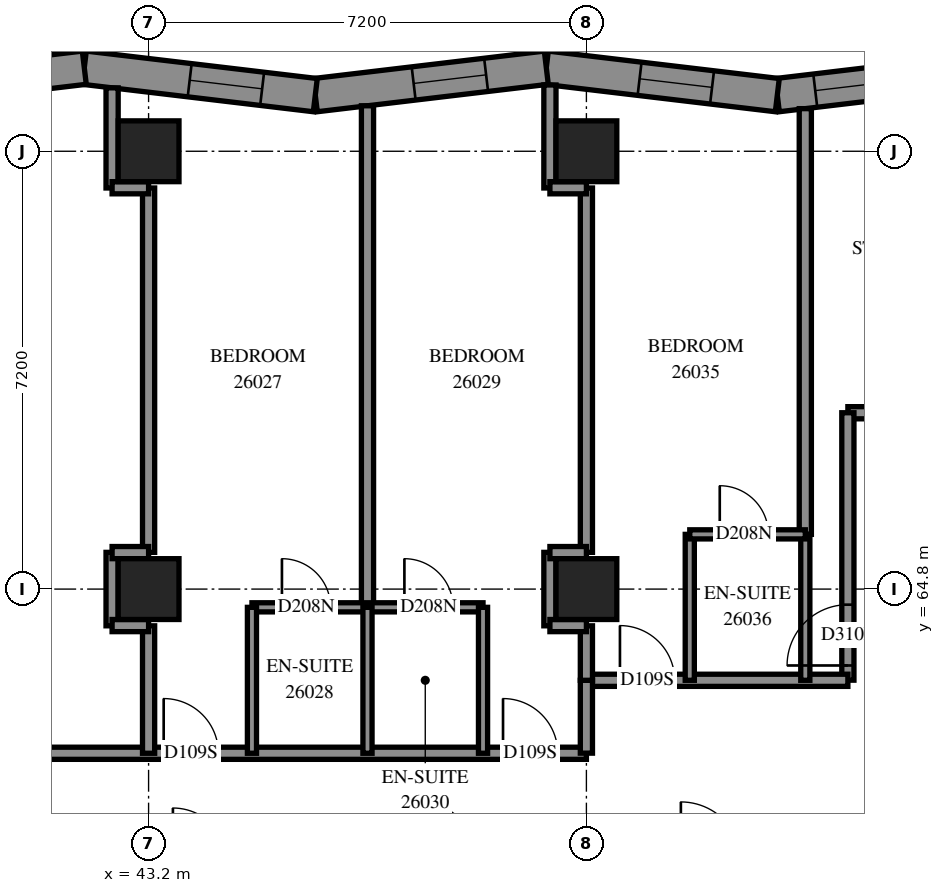
"""IFC4 building model, lengths in metres.
Left out: names, types, materials, properties, quantities, classifications, styles, units other than length and angle.
Written with IfcOpenShell. Run it as: python <this file> out.ifc"""

import sys

from ifc_helpers import new_model, si_unit, direction, frame, frame_2d, origin, origin_2d, place, context, subcontext, project, spatial, polyline, rectangle, outline, extrude, element, fill, save


model = new_model("IFC4")
c1 = context("Model", 3, precision=1e-05, world=origin(), true_north=direction((0.0, 1.0)))
c2 = subcontext(c1, "Body", "Model", "MODEL_VIEW")
j1 = project(units=[si_unit("LENGTHUNIT", "METRE"), si_unit("PLANEANGLEUNIT", "RADIAN")], contexts=[c1])
p1 = place(None, origin())
s1 = spatial("IfcSite", under=j1, at=p1, CompositionType="ELEMENT")
p2 = place(p1, origin())
s2 = spatial("IfcBuilding", under=s1, at=p2, CompositionType="ELEMENT")
p3 = place(p2, frame((0.0, 0.0, 98.2)))
s3 = spatial("IfcBuildingStorey", under=s2, at=p3, CompositionType="ELEMENT", Elevation=98.2)
for number, where, z_axis, x_axis in (
    (1, (43.2, 64.8, 0.0), (0.0, 0.0, 1.0), (1.0, 0.0, 0.0)),
    (2, (43.2, 72.0, 0.0), (0.0, 0.0, 1.0), (1.0, 0.0, 0.0)),
    (3, (50.4, 64.8, 0.0), (0.0, 0.0, 1.0), (1.0, 0.0, 0.0)),
    (4, (50.4, 72.0, 0.0), (0.0, 0.0, 1.0), (1.0, 0.0, 0.0)),
):
    element("IfcColumn", number, at=place(p3, frame(where, z_axis=z_axis, x_axis=x_axis)), inside=s3, PredefinedType="COLUMN", context=c2, shape_type="SweptSolid", body=[
        extrude(rectangle(XDim=1.0, YDim=1.0, at=origin_2d()), origin(), (0.0, 0.0, 1.0), 3.1),
    ])
p4 = place(p3, frame((57.339, 73.374, 0.0), z_axis=(0.0, 0.0, 1.0), x_axis=(-0.9930265769, -0.1178907016, 0.0)))
e5 = element("IfcWall", 5, at=p4, inside=s3, PredefinedType="SOLIDWALL", context=c2, shape_type="SweptSolid", body=[
    extrude(outline(polyline([(-0.033, -0.275), (3.793, -0.275), (3.858, 0.275), (0.033, 0.275), (-0.033, -0.275)])), origin(), (0.0, 0.0, 1.0), 3.1),
])
p5 = place(p4, frame((0.397, 0.0, 0.5)))
e6 = element("IfcOpeningElement", 6, at=p5, cuts=e5, PredefinedType="OPENING", context=c2, shape_type="SweptSolid", body=[
    extrude(rectangle(XDim=1.3, YDim=2.45, at=frame_2d((0.65, 1.225))), frame((0.0, 0.285, 0.0), z_axis=(0.0, -1.0, 0.0), x_axis=(1.0, 0.0, 0.0)), (0.0, 0.0, 1.0), 0.57),
])
p6 = place(p4, frame((1.897, 0.0, 0.5)))
e7 = element("IfcOpeningElement", 7, at=p6, cuts=e5, PredefinedType="OPENING", context=c2, shape_type="SweptSolid", body=[
    extrude(rectangle(XDim=1.3, YDim=2.45, at=frame_2d((0.65, 1.225))), frame((0.0, 0.285, 0.0), z_axis=(0.0, -1.0, 0.0), x_axis=(1.0, 0.0, 0.0)), (0.0, 0.0, 1.0), 0.57),
])
p7 = place(p3, frame((53.54, 72.923, 0.0), z_axis=(0.0, 0.0, 1.0), x_axis=(-0.9930269402, 0.1178876415, 0.0)))
e8 = element("IfcWall", 8, at=p7, inside=s3, PredefinedType="SOLIDWALL", context=c2, shape_type="SweptSolid", body=[
    extrude(outline(polyline([(0.033, -0.275), (3.858, -0.275), (3.793, 0.275), (-0.033, 0.275), (0.033, -0.275)])), origin(), (0.0, 0.0, 1.0), 3.1),
])
p8 = place(p7, frame((1.081, 0.0, 0.5)))
e9 = element("IfcOpeningElement", 9, at=p8, cuts=e8, PredefinedType="OPENING", context=c2, shape_type="SweptSolid", body=[
    extrude(rectangle(XDim=1.2, YDim=2.45, at=frame_2d((0.6, 1.225))), frame((0.0, 0.285, 0.0), z_axis=(0.0, -1.0, 0.0), x_axis=(1.0, 0.0, 0.0)), (0.0, 0.0, 1.0), 0.57),
])
p9 = place(p3, frame((49.741, 73.374, 0.0), z_axis=(0.0, 0.0, 1.0), x_axis=(-0.9930265769, -0.1178907016, 0.0)))
e10 = element("IfcWall", 10, at=p9, inside=s3, PredefinedType="SOLIDWALL", context=c2, shape_type="SweptSolid", body=[
    extrude(outline(polyline([(-0.033, -0.275), (3.793, -0.275), (3.858, 0.275), (0.033, 0.275), (-0.033, -0.275)])), origin(), (0.0, 0.0, 1.0), 3.1),
])
p10 = place(p9, frame((0.997, 0.0, 0.5)))
e11 = element("IfcOpeningElement", 11, at=p10, cuts=e10, PredefinedType="OPENING", context=c2, shape_type="SweptSolid", body=[
    extrude(rectangle(XDim=1.2, YDim=2.45, at=frame_2d((0.6, 1.225))), frame((0.0, 0.285, 0.0), z_axis=(0.0, -1.0, 0.0), x_axis=(1.0, 0.0, 0.0)), (0.0, 0.0, 1.0), 0.57),
])
p11 = place(p3, frame((45.942, 72.923, 0.0), z_axis=(0.0, 0.0, 1.0), x_axis=(-0.9930269402, 0.1178876415, 0.0)))
e12 = element("IfcWall", 12, at=p11, inside=s3, PredefinedType="SOLIDWALL", context=c2, shape_type="SweptSolid", body=[
    extrude(outline(polyline([(0.033, -0.275), (3.858, -0.275), (3.793, 0.275), (-0.033, 0.275), (0.033, -0.275)])), origin(), (0.0, 0.0, 1.0), 3.1),
])
p12 = place(p11, frame((0.88, 0.0, 0.5)))
e13 = element("IfcOpeningElement", 13, at=p12, cuts=e12, PredefinedType="OPENING", context=c2, shape_type="SweptSolid", body=[
    extrude(rectangle(XDim=1.2, YDim=2.45, at=frame_2d((0.6, 1.225))), frame((0.0, 0.285, 0.0), z_axis=(0.0, -1.0, 0.0), x_axis=(1.0, 0.0, 0.0)), (0.0, 0.0, 1.0), 0.57),
])
p13 = place(p3, frame((42.143, 73.374, 0.0), z_axis=(0.0, 0.0, 1.0), x_axis=(-0.9930269402, -0.1178876415, 0.0)))
e14 = element("IfcWall", 14, at=p13, inside=s3, PredefinedType="SOLIDWALL", context=c2, shape_type="SweptSolid", body=[
    extrude(outline(polyline([(-0.033, -0.275), (3.793, -0.275), (3.858, 0.275), (0.033, 0.275), (-0.033, -0.275)])), origin(), (0.0, 0.0, 1.0), 3.1),
])
p14 = place(p13, frame((0.797, 0.0, 0.5)))
e15 = element("IfcOpeningElement", 15, at=p14, cuts=e14, PredefinedType="OPENING", context=c2, shape_type="SweptSolid", body=[
    extrude(rectangle(XDim=1.2, YDim=2.45, at=frame_2d((0.6, 1.225))), frame((0.0, 0.285, 0.0), z_axis=(0.0, -1.0, 0.0), x_axis=(1.0, 0.0, 0.0)), (0.0, 0.0, 1.0), 0.57),
])
p15 = place(p3, frame((54.7, 67.7, 0.0), z_axis=(0.0, 0.0, 1.0), x_axis=(1.0, 0.0, 0.0)))
e16 = element("IfcWall", 16, at=p15, inside=s3, PredefinedType="PARTITIONING", context=c2, shape_type="SweptSolid", body=[
    extrude(rectangle(XDim=20.2, YDim=0.2, at=frame_2d((10.1, 0.0))), origin(), (0.0, 0.0, 1.0), 3.1),
])
p16 = place(p15, frame((5.25, 0.0, 0.0)))
e17 = element("IfcOpeningElement", 17, at=p16, cuts=e16, PredefinedType="OPENING", context=c2, shape_type="SweptSolid", body=[
    extrude(rectangle(XDim=0.9, YDim=2.1, at=frame_2d((0.45, 1.05))), frame((0.0, 0.11, 0.0), z_axis=(0.0, -1.0, 0.0), x_axis=(1.0, 0.0, 0.0)), (0.0, 0.0, 1.0), 0.22),
])
p17 = place(p15, frame((6.9, 0.0, 0.0)))
e18 = element("IfcOpeningElement", 18, at=p17, cuts=e16, PredefinedType="OPENING", context=c2, shape_type="SweptSolid", body=[
    extrude(rectangle(XDim=0.9, YDim=2.1, at=frame_2d((0.45, 1.05))), frame((0.0, 0.11, 0.0), z_axis=(0.0, -1.0, 0.0), x_axis=(1.0, 0.0, 0.0)), (0.0, 0.0, 1.0), 0.22),
])
p18 = place(p15, frame((12.45, 0.0, 0.0)))
e19 = element("IfcOpeningElement", 19, at=p18, cuts=e16, PredefinedType="OPENING", context=c2, shape_type="SweptSolid", body=[
    extrude(rectangle(XDim=0.9, YDim=2.1, at=frame_2d((0.45, 1.05))), frame((0.0, 0.11, 0.0), z_axis=(0.0, -1.0, 0.0), x_axis=(1.0, 0.0, 0.0)), (0.0, 0.0, 1.0), 0.22),
])
p19 = place(p15, frame((14.1, 0.0, 0.0)))
e20 = element("IfcOpeningElement", 20, at=p19, cuts=e16, PredefinedType="OPENING", context=c2, shape_type="SweptSolid", body=[
    extrude(rectangle(XDim=0.9, YDim=2.1, at=frame_2d((0.45, 1.05))), frame((0.0, 0.11, 0.0), z_axis=(0.0, -1.0, 0.0), x_axis=(1.0, 0.0, 0.0)), (0.0, 0.0, 1.0), 0.22),
])
p20 = place(p3, frame((33.3, 62.1, 0.0), z_axis=(0.0, 0.0, 1.0), x_axis=(1.0, 0.0, 0.0)))
e21 = element("IfcWall", 21, at=p20, inside=s3, PredefinedType="PARTITIONING", context=c2, shape_type="SweptSolid", body=[
    extrude(rectangle(XDim=17.1, YDim=0.2, at=frame_2d((8.55, 0.0))), origin(), (0.0, 0.0, 1.0), 3.1),
])
p21 = place(p20, frame((6.258, 0.0, 0.0)))
e22 = element("IfcOpeningElement", 22, at=p21, cuts=e21, PredefinedType="OPENING", context=c2, shape_type="SweptSolid", body=[
    extrude(rectangle(XDim=1.0, YDim=2.1, at=frame_2d((0.5, 1.05))), frame((0.0, 0.11, 0.0), z_axis=(0.0, -1.0, 0.0), x_axis=(1.0, 0.0, 0.0)), (0.0, 0.0, 1.0), 0.22),
])
p22 = place(p20, frame((10.148, 0.0, 0.0)))
e23 = element("IfcOpeningElement", 23, at=p22, cuts=e21, PredefinedType="OPENING", context=c2, shape_type="SweptSolid", body=[
    extrude(rectangle(XDim=0.9, YDim=2.1, at=frame_2d((0.45, 1.05))), frame((0.0, 0.11, 0.0), z_axis=(0.0, -1.0, 0.0), x_axis=(1.0, 0.0, 0.0)), (0.0, 0.0, 1.0), 0.22),
])
p23 = place(p20, frame((15.729, 0.0, 0.0)))
e24 = element("IfcOpeningElement", 24, at=p23, cuts=e21, PredefinedType="OPENING", context=c2, shape_type="SweptSolid", body=[
    extrude(rectangle(XDim=0.9, YDim=2.1, at=frame_2d((0.45, 1.05))), frame((0.0, 0.11, 0.0), z_axis=(0.0, -1.0, 0.0), x_axis=(1.0, 0.0, 0.0)), (0.0, 0.0, 1.0), 0.22),
])
p24 = place(p3, frame((46.8, 64.5, 0.0), z_axis=(0.0, 0.0, 1.0), x_axis=(0.0, 1.0, 0.0)))
e25 = element("IfcWall", 25, at=p24, inside=s3, PredefinedType="PARTITIONING", context=c2, shape_type="SweptSolid", body=[
    extrude(rectangle(XDim=8.248, YDim=0.2, at=frame_2d((4.124, 0.0))), origin(), (0.0, 0.0, 1.0), 3.1),
])
p25 = place(p3, frame((54.0, 65.7, 0.0), z_axis=(0.0, 0.0, 1.0), x_axis=(0.0, 1.0, 0.0)))
e26 = element("IfcWall", 26, at=p25, inside=s3, PredefinedType="PARTITIONING", context=c2, shape_type="SweptSolid", body=[
    extrude(rectangle(XDim=7.001, YDim=0.2, at=frame_2d((3.5, 0.0))), origin(), (0.0, 0.0, 1.0), 3.1),
])
for number, where, z_axis, x_axis in (
    (27, (43.2, 65.404, 0.0), (0.0, 0.0, 1.0), (0.0, 1.0, 0.0)),
    (28, (50.4, 65.404, 0.0), (0.0, 0.0, 1.0), (0.0, 1.0, 0.0)),
):
    element("IfcWall", number, at=place(p3, frame(where, z_axis=z_axis, x_axis=x_axis)), inside=s3, PredefinedType="PARTITIONING", context=c2, shape_type="SweptSolid", body=[
        extrude(rectangle(XDim=5.992, YDim=0.2, at=frame_2d((2.996, 0.0))), origin(), (0.0, 0.0, 1.0), 3.1),
    ])
p26 = place(p3, frame((54.7, 63.302, 0.0), z_axis=(0.0, 0.0, 1.0), x_axis=(0.0, 1.0, 0.0)))
e29 = element("IfcWall", 29, at=p26, inside=s3, PredefinedType="PARTITIONING", context=c2, shape_type="SweptSolid", body=[
    extrude(rectangle(XDim=4.398, YDim=0.2, at=frame_2d((2.199, 0.0))), origin(), (0.0, 0.0, 1.0), 3.1),
])
p27 = place(p26, frame((0.242, 0.0, 0.0)))
e30 = element("IfcOpeningElement", 30, at=p27, cuts=e29, PredefinedType="OPENING", context=c2, shape_type="SweptSolid", body=[
    extrude(rectangle(XDim=1.0, YDim=2.1, at=frame_2d((0.5, 1.05))), frame((0.0, 0.11, 0.0), z_axis=(0.0, -1.0, 0.0), x_axis=(1.0, 0.0, 0.0)), (0.0, 0.0, 1.0), 0.22),
])
p28 = place(p3, frame((50.4, 63.3, 0.0), z_axis=(0.0, 0.0, 1.0), x_axis=(1.0, 0.0, 0.0)))
e31 = element("IfcWall", 31, at=p28, inside=s3, PredefinedType="PARTITIONING", context=c2, shape_type="SweptSolid", body=[
    extrude(rectangle(XDim=4.3, YDim=0.2, at=frame_2d((2.15, 0.0))), origin(), (0.0, 0.0, 1.0), 3.1),
])
p29 = place(p28, frame((0.552, 0.0, 0.0)))
e32 = element("IfcOpeningElement", 32, at=p29, cuts=e31, PredefinedType="OPENING", context=c2, shape_type="SweptSolid", body=[
    extrude(rectangle(XDim=0.9, YDim=2.1, at=frame_2d((0.45, 1.05))), frame((0.0, 0.11, 0.0), z_axis=(0.0, -1.0, 0.0), x_axis=(1.0, 0.0, 0.0)), (0.0, 0.0, 1.0), 0.22),
])
p30 = place(p3, frame((44.9, 64.5, 0.0), z_axis=(0.0, 0.0, 1.0), x_axis=(1.0, 0.0, 0.0)))
e33 = element("IfcWall", 33, at=p30, inside=s3, PredefinedType="PARTITIONING", context=c2, shape_type="SweptSolid", body=[
    extrude(rectangle(XDim=3.8, YDim=0.15, at=frame_2d((1.9, 0.0))), origin(), (0.0, 0.0, 1.0), 3.1),
])
p31 = place(p30, frame((0.493, 0.0, 0.0)))
e34 = element("IfcOpeningElement", 34, at=p31, cuts=e33, PredefinedType="OPENING", context=c2, shape_type="SweptSolid", body=[
    extrude(rectangle(XDim=0.8, YDim=2.1, at=frame_2d((0.4, 1.05))), frame((0.0, 0.085, 0.0), z_axis=(0.0, -1.0, 0.0), x_axis=(1.0, 0.0, 0.0)), (0.0, 0.0, 1.0), 0.17),
])
p32 = place(p30, frame((2.507, 0.0, 0.0)))
e35 = element("IfcOpeningElement", 35, at=p32, cuts=e33, PredefinedType="OPENING", context=c2, shape_type="SweptSolid", body=[
    extrude(rectangle(XDim=0.8, YDim=2.1, at=frame_2d((0.4, 1.05))), frame((0.0, 0.085, 0.0), z_axis=(0.0, -1.0, 0.0), x_axis=(1.0, 0.0, 0.0)), (0.0, 0.0, 1.0), 0.17),
])
for number, where, z_axis, x_axis in (
    (36, (52.1, 63.3, 0.0), (0.0, 0.0, 1.0), (0.0, 1.0, 0.0)),
    (37, (54.0, 63.3, 0.0), (0.0, 0.0, 1.0), (0.0, 1.0, 0.0)),
    (38, (44.9, 62.1, 0.0), (0.0, 0.0, 1.0), (0.0, 1.0, 0.0)),
    (39, (46.8, 62.1, 0.0), (0.0, 0.0, 1.0), (0.0, 1.0, 0.0)),
    (40, (48.7, 62.1, 0.0), (0.0, 0.0, 1.0), (0.0, 1.0, 0.0)),
):
    element("IfcWall", number, at=place(p3, frame(where, z_axis=z_axis, x_axis=x_axis)), inside=s3, PredefinedType="PARTITIONING", context=c2, shape_type="SweptSolid", body=[
        extrude(rectangle(XDim=2.4, YDim=0.15, at=frame_2d((1.2, 0.0))), origin(), (0.0, 0.0, 1.0), 3.1),
    ])
p33 = place(p3, frame((43.2, 62.1, 0.0), z_axis=(0.0, 0.0, 1.0), x_axis=(0.0, 1.0, 0.0)))
e41 = element("IfcWall", 41, at=p33, inside=s3, PredefinedType="PARTITIONING", context=c2, shape_type="SweptSolid", body=[
    extrude(rectangle(XDim=2.096, YDim=0.2, at=frame_2d((1.048, 0.0))), origin(), (0.0, 0.0, 1.0), 3.1),
])
p34 = place(p3, frame((52.1, 65.7, 0.0), z_axis=(0.0, 0.0, 1.0), x_axis=(1.0, 0.0, 0.0)))
e42 = element("IfcWall", 42, at=p34, inside=s3, PredefinedType="PARTITIONING", context=c2, shape_type="SweptSolid", body=[
    extrude(rectangle(XDim=1.9, YDim=0.15, at=frame_2d((0.95, 0.0))), origin(), (0.0, 0.0, 1.0), 3.1),
])
p35 = place(p34, frame((0.493, 0.0, 0.0)))
e43 = element("IfcOpeningElement", 43, at=p35, cuts=e42, PredefinedType="OPENING", context=c2, shape_type="SweptSolid", body=[
    extrude(rectangle(XDim=0.8, YDim=2.1, at=frame_2d((0.4, 1.05))), frame((0.0, 0.085, 0.0), z_axis=(0.0, -1.0, 0.0), x_axis=(1.0, 0.0, 0.0)), (0.0, 0.0, 1.0), 0.17),
])
p36 = place(p3, frame((49.8, 71.396, 0.0), z_axis=(0.0, 0.0, 1.0), x_axis=(0.0, 1.0, 0.0)))
e44 = element("IfcWall", 44, at=p36, inside=s3, PredefinedType="PARTITIONING", context=c2, shape_type="SweptSolid", body=[
    extrude(rectangle(XDim=1.694, YDim=0.2, at=frame_2d((0.847, 0.0))), origin(), (0.0, 0.0, 1.0), 3.1),
])
p37 = place(p3, frame((42.6, 71.396, 0.0), z_axis=(0.0, 0.0, 1.0), x_axis=(0.0, 1.0, 0.0)))
e45 = element("IfcWall", 45, at=p37, inside=s3, PredefinedType="PARTITIONING", context=c2, shape_type="SweptSolid", body=[
    extrude(rectangle(XDim=1.647, YDim=0.2, at=frame_2d((0.824, 0.0))), origin(), (0.0, 0.0, 1.0), 3.1),
])
for number, where, z_axis, x_axis in (
    (46, (42.6, 64.196, 0.0), (0.0, 0.0, 1.0), (0.0, 1.0, 0.0)),
    (47, (49.8, 64.196, 0.0), (0.0, 0.0, 1.0), (0.0, 1.0, 0.0)),
):
    element("IfcWall", number, at=place(p3, frame(where, z_axis=z_axis, x_axis=x_axis)), inside=s3, PredefinedType="PARTITIONING", context=c2, shape_type="SweptSolid", body=[
        extrude(rectangle(XDim=1.208, YDim=0.2, at=frame_2d((0.604, 0.0))), origin(), (0.0, 0.0, 1.0), 3.1),
    ])
p38 = place(p3, frame((50.4, 62.102, 0.0), z_axis=(0.0, 0.0, 1.0), x_axis=(0.0, 1.0, 0.0)))
e48 = element("IfcWall", 48, at=p38, inside=s3, PredefinedType="PARTITIONING", context=c2, shape_type="SweptSolid", body=[
    extrude(rectangle(XDim=1.198, YDim=0.2, at=frame_2d((0.599, 0.0))), origin(), (0.0, 0.0, 1.0), 3.1),
])
p39 = place(p3, frame((50.4, 63.3, 0.0), z_axis=(0.0, 0.0, 1.0), x_axis=(0.0, 1.0, 0.0)))
e49 = element("IfcWall", 49, at=p39, inside=s3, PredefinedType="PARTITIONING", context=c2, shape_type="SweptSolid", body=[
    extrude(rectangle(XDim=0.896, YDim=0.2, at=frame_2d((0.448, 0.0))), origin(), (0.0, 0.0, 1.0), 3.1),
])
for number, where, z_axis, x_axis in (
    (50, (42.6, 71.4, 0.0), (0.0, 0.0, 1.0), (1.0, 0.0, 0.0)),
    (51, (49.8, 71.4, 0.0), (0.0, 0.0, 1.0), (1.0, 0.0, 0.0)),
    (52, (42.6, 65.4, 0.0), (0.0, 0.0, 1.0), (1.0, 0.0, 0.0)),
    (53, (49.8, 65.4, 0.0), (0.0, 0.0, 1.0), (1.0, 0.0, 0.0)),
    (54, (42.6, 64.2, 0.0), (0.0, 0.0, 1.0), (1.0, 0.0, 0.0)),
    (55, (49.8, 64.2, 0.0), (0.0, 0.0, 1.0), (1.0, 0.0, 0.0)),
):
    element("IfcWall", number, at=place(p3, frame(where, z_axis=z_axis, x_axis=x_axis)), inside=s3, PredefinedType="PARTITIONING", context=c2, shape_type="SweptSolid", body=[
        extrude(rectangle(XDim=0.6, YDim=0.2, at=frame_2d((0.3, 0.0))), origin(), (0.0, 0.0, 1.0), 3.1),
    ])
p40 = place(p6, origin())
e56 = element("IfcWindow", 56, at=p40, inside=s3, PartitioningType="SINGLE_PANEL", PredefinedType="WINDOW", context=c2, shape_type="SweptSolid", body=[
    extrude(rectangle(XDim=1.3, YDim=2.45, at=frame_2d((0.65, 1.225))), frame((0.0, 0.155, 0.0), z_axis=(0.0, -1.0, 0.0), x_axis=(1.0, 0.0, 0.0)), (0.0, 0.0, 1.0), 0.06),
])
fill(e7, e56)
p41 = place(p8, origin())
e57 = element("IfcWindow", 57, at=p41, inside=s3, PartitioningType="SINGLE_PANEL", PredefinedType="WINDOW", context=c2, shape_type="SweptSolid", body=[
    extrude(rectangle(XDim=1.2, YDim=2.45, at=frame_2d((0.6, 1.225))), frame((0.0, 0.155, 0.0), z_axis=(0.0, -1.0, 0.0), x_axis=(1.0, 0.0, 0.0)), (0.0, 0.0, 1.0), 0.06),
])
fill(e9, e57)
p42 = place(p10, origin())
e58 = element("IfcWindow", 58, at=p42, inside=s3, PartitioningType="SINGLE_PANEL", PredefinedType="WINDOW", context=c2, shape_type="SweptSolid", body=[
    extrude(rectangle(XDim=1.2, YDim=2.45, at=frame_2d((0.6, 1.225))), frame((0.0, 0.155, 0.0), z_axis=(0.0, -1.0, 0.0), x_axis=(1.0, 0.0, 0.0)), (0.0, 0.0, 1.0), 0.06),
])
fill(e11, e58)
p43 = place(p12, origin())
e59 = element("IfcWindow", 59, at=p43, inside=s3, PartitioningType="SINGLE_PANEL", PredefinedType="WINDOW", context=c2, shape_type="SweptSolid", body=[
    extrude(rectangle(XDim=1.2, YDim=2.45, at=frame_2d((0.6, 1.225))), frame((0.0, 0.155, 0.0), z_axis=(0.0, -1.0, 0.0), x_axis=(1.0, 0.0, 0.0)), (0.0, 0.0, 1.0), 0.06),
])
fill(e13, e59)
p44 = place(p22, origin())
e60 = element("IfcDoor", 60, at=p44, inside=s3, OperationType="SINGLE_SWING_RIGHT", PredefinedType="DOOR", context=c2, shape_type="SweptSolid", body=[
    extrude(rectangle(XDim=0.9, YDim=2.1, at=frame_2d((0.45, 1.05))), frame((0.0, 0.025, 0.0), z_axis=(0.0, -1.0, 0.0), x_axis=(1.0, 0.0, 0.0)), (0.0, 0.0, 1.0), 0.05),
])
fill(e23, e60)
p45 = place(p31, origin())
e61 = element("IfcDoor", 61, at=p45, inside=s3, OperationType="SINGLE_SWING_RIGHT", PredefinedType="DOOR", context=c2, shape_type="SweptSolid", body=[
    extrude(rectangle(XDim=0.8, YDim=2.1, at=frame_2d((0.4, 1.05))), frame((0.0, 0.025, 0.0), z_axis=(0.0, -1.0, 0.0), x_axis=(1.0, 0.0, 0.0)), (0.0, 0.0, 1.0), 0.05),
])
fill(e34, e61)
p46 = place(p23, origin())
e62 = element("IfcDoor", 62, at=p46, inside=s3, OperationType="SINGLE_SWING_LEFT", PredefinedType="DOOR", context=c2, shape_type="SweptSolid", body=[
    extrude(rectangle(XDim=0.9, YDim=2.1, at=frame_2d((0.45, 1.05))), frame((0.0, 0.025, 0.0), z_axis=(0.0, -1.0, 0.0), x_axis=(1.0, 0.0, 0.0)), (0.0, 0.0, 1.0), 0.05),
])
fill(e24, e62)
p47 = place(p32, origin())
e63 = element("IfcDoor", 63, at=p47, inside=s3, OperationType="SINGLE_SWING_RIGHT", PredefinedType="DOOR", context=c2, shape_type="SweptSolid", body=[
    extrude(rectangle(XDim=0.8, YDim=2.1, at=frame_2d((0.4, 1.05))), frame((0.0, 0.025, 0.0), z_axis=(0.0, -1.0, 0.0), x_axis=(1.0, 0.0, 0.0)), (0.0, 0.0, 1.0), 0.05),
])
fill(e35, e63)
p48 = place(p29, origin())
e64 = element("IfcDoor", 64, at=p48, inside=s3, OperationType="SINGLE_SWING_RIGHT", PredefinedType="DOOR", context=c2, shape_type="SweptSolid", body=[
    extrude(rectangle(XDim=0.9, YDim=2.1, at=frame_2d((0.45, 1.05))), frame((0.0, 0.025, 0.0), z_axis=(0.0, -1.0, 0.0), x_axis=(1.0, 0.0, 0.0)), (0.0, 0.0, 1.0), 0.05),
])
fill(e32, e64)
p49 = place(p35, origin())
e65 = element("IfcDoor", 65, at=p49, inside=s3, OperationType="SINGLE_SWING_RIGHT", PredefinedType="DOOR", context=c2, shape_type="SweptSolid", body=[
    extrude(rectangle(XDim=0.8, YDim=2.1, at=frame_2d((0.4, 1.05))), frame((0.0, 0.025, 0.0), z_axis=(0.0, -1.0, 0.0), x_axis=(1.0, 0.0, 0.0)), (0.0, 0.0, 1.0), 0.05),
])
fill(e43, e65)
p50 = place(p27, origin())
e66 = element("IfcDoor", 66, at=p50, inside=s3, OperationType="SINGLE_SWING_LEFT", PredefinedType="DOOR", context=c2, shape_type="SweptSolid", body=[
    extrude(rectangle(XDim=1.0, YDim=2.1, at=frame_2d((0.5, 1.05))), frame((0.0, 0.025, 0.0), z_axis=(0.0, -1.0, 0.0), x_axis=(1.0, 0.0, 0.0)), (0.0, 0.0, 1.0), 0.05),
])
fill(e30, e66)
save(model, sys.argv[1])
